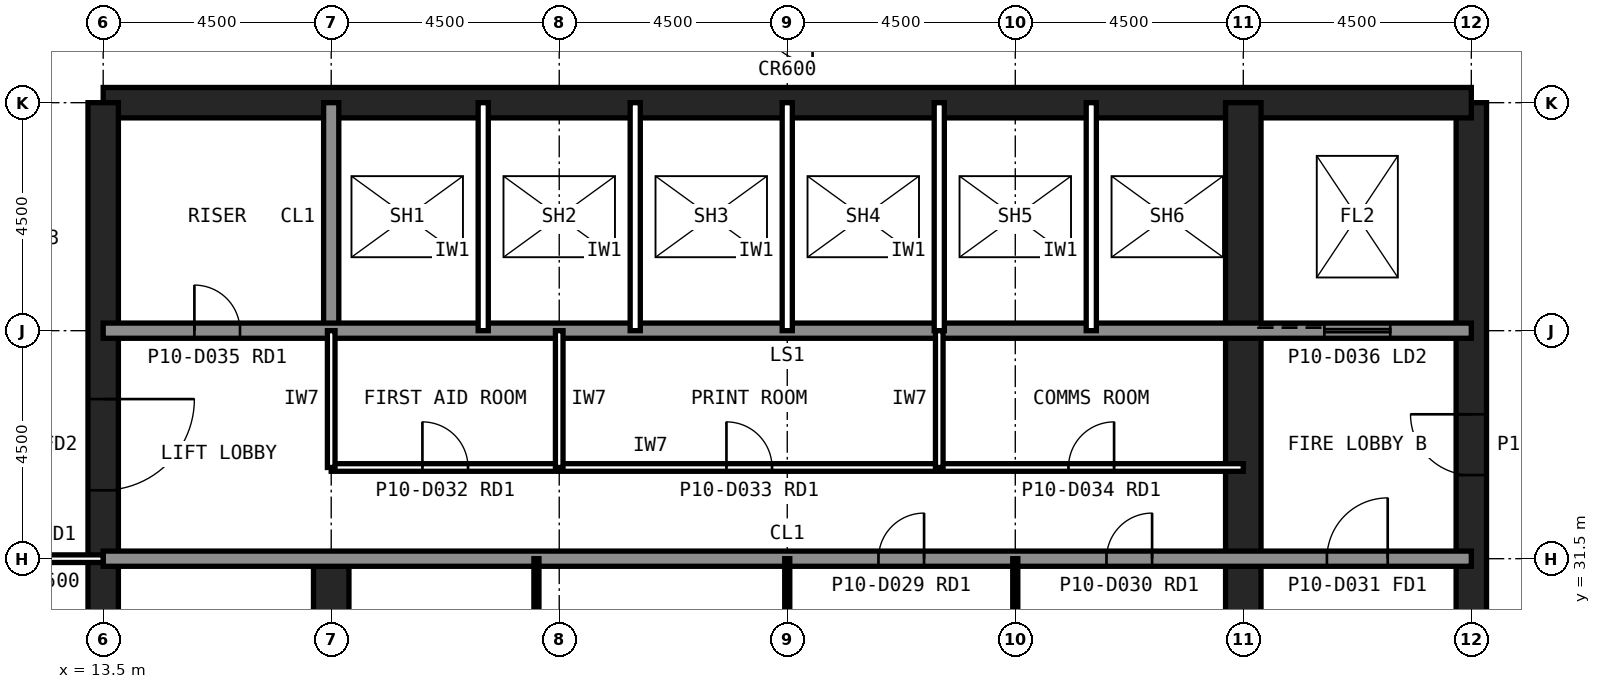
"""IFC4 building model, lengths in metres.
Left out: names, types, materials, properties, quantities, classifications, styles, units other than length and angle.
Written with IfcOpenShell. Run it as: python <this file> out.ifc"""

import sys

from ifc_helpers import new_model, si_unit, direction, frame, frame_2d, origin, place, context, subcontext, project, spatial, rectangle, extrude, element, fill, save


model = new_model("IFC4")
c1 = context("Model", 3, precision=1e-05, world=origin(), true_north=direction((0.0, 1.0)))
c2 = subcontext(c1, "Body", "Model", "MODEL_VIEW")
j1 = project(units=[si_unit("LENGTHUNIT", "METRE"), si_unit("PLANEANGLEUNIT", "RADIAN")], contexts=[c1])
p1 = place(None, origin())
s1 = spatial("IfcSite", under=j1, at=p1, CompositionType="ELEMENT")
p2 = place(p1, origin())
s2 = spatial("IfcBuilding", under=s1, at=p2, CompositionType="ELEMENT")
p3 = place(p2, frame((0.0, 0.0, 45.8)))
s3 = spatial("IfcBuildingStorey", under=s2, at=p3, CompositionType="ELEMENT", Elevation=45.8)
p4 = place(p3, frame((40.5, 13.5, 0.0), z_axis=(0.0, 0.0, 1.0), x_axis=(0.0, 1.0, 0.0)))
e1 = element("IfcWall", 1, at=p4, inside=s3, PredefinedType="SHEAR", context=c2, shape_type="SweptSolid", body=[
    extrude(rectangle(XDim=27.0, YDim=0.6, at=frame_2d((13.5, 0.0))), origin(), (0.0, 0.0, 1.0), 4.2),
])
p5 = place(p4, frame((5.85, 0.0, 0.0)))
e2 = element("IfcOpeningElement", 2, at=p5, cuts=e1, PredefinedType="OPENING", context=c2, shape_type="SweptSolid", body=[
    extrude(rectangle(XDim=1.8, YDim=2.1, at=frame_2d((0.9, 1.05))), frame((0.0, 0.31, 0.0), z_axis=(0.0, -1.0, 0.0), x_axis=(1.0, 0.0, 0.0)), (0.0, 0.0, 1.0), 0.62),
])
p6 = place(p4, frame((19.65, 0.0, 0.0)))
e3 = element("IfcOpeningElement", 3, at=p6, cuts=e1, PredefinedType="OPENING", context=c2, shape_type="SweptSolid", body=[
    extrude(rectangle(XDim=1.2, YDim=2.1, at=frame_2d((0.6, 1.05))), frame((0.0, 0.31, 0.0), z_axis=(0.0, -1.0, 0.0), x_axis=(1.0, 0.0, 0.0)), (0.0, 0.0, 1.0), 0.62),
])
p7 = place(p3, frame((40.5, 40.5, 0.0), z_axis=(0.0, 0.0, 1.0), x_axis=(-1.0, 0.0, 0.0)))
e4 = element("IfcWall", 4, at=p7, inside=s3, PredefinedType="SHEAR", context=c2, shape_type="SweptSolid", body=[
    extrude(rectangle(XDim=27.0, YDim=0.6, at=frame_2d((13.5, 0.0))), origin(), (0.0, 0.0, 1.0), 4.2),
])
p8 = place(p3, frame((13.5, 40.5, 0.0), z_axis=(0.0, 0.0, 1.0), x_axis=(0.0, -1.0, 0.0)))
e5 = element("IfcWall", 5, at=p8, inside=s3, PredefinedType="SHEAR", context=c2, shape_type="SweptSolid", body=[
    extrude(rectangle(XDim=27.0, YDim=0.6, at=frame_2d((13.5, 0.0))), origin(), (0.0, 0.0, 1.0), 4.2),
])
p9 = place(p8, frame((19.65, 0.0, 0.0)))
e6 = element("IfcOpeningElement", 6, at=p9, cuts=e5, PredefinedType="OPENING", context=c2, shape_type="SweptSolid", body=[
    extrude(rectangle(XDim=1.2, YDim=2.1, at=frame_2d((0.6, 1.05))), frame((0.0, 0.31, 0.0), z_axis=(0.0, -1.0, 0.0), x_axis=(1.0, 0.0, 0.0)), (0.0, 0.0, 1.0), 0.62),
])
p10 = place(p8, frame((5.85, 0.0, 0.0)))
e7 = element("IfcOpeningElement", 7, at=p10, cuts=e5, PredefinedType="OPENING", context=c2, shape_type="SweptSolid", body=[
    extrude(rectangle(XDim=1.8, YDim=2.1, at=frame_2d((0.9, 1.05))), frame((0.0, 0.31, 0.0), z_axis=(0.0, -1.0, 0.0), x_axis=(1.0, 0.0, 0.0)), (0.0, 0.0, 1.0), 0.62),
])
p11 = place(p3, frame((18.0, 13.5, 0.0), z_axis=(0.0, 0.0, 1.0), x_axis=(0.0, 1.0, 0.0)))
e8 = element("IfcWall", 8, at=p11, inside=s3, PredefinedType="SHEAR", context=c2, shape_type="SweptSolid", body=[
    extrude(rectangle(XDim=18.0, YDim=0.7, at=frame_2d((9.0, 0.0))), origin(), (0.0, 0.0, 1.0), 4.2),
])
p12 = place(p3, frame((18.0, 36.0, 0.0), z_axis=(0.0, 0.0, 1.0), x_axis=(0.0, 1.0, 0.0)))
e9 = element("IfcWall", 9, at=p12, inside=s3, PredefinedType="SOLIDWALL", context=c2, shape_type="SweptSolid", body=[
    extrude(rectangle(XDim=4.5, YDim=0.3, at=frame_2d((2.25, 0.0))), origin(), (0.0, 0.0, 1.0), 4.04),
])
p13 = place(p3, frame((36.0, 22.5, 0.0), z_axis=(0.0, 0.0, 1.0), x_axis=(0.0, 1.0, 0.0)))
e10 = element("IfcWall", 10, at=p13, inside=s3, PredefinedType="SHEAR", context=c2, shape_type="SweptSolid", body=[
    extrude(rectangle(XDim=18.0, YDim=0.7, at=frame_2d((9.0, 0.0))), origin(), (0.0, 0.0, 1.0), 4.2),
])
p14 = place(p3, frame((13.5, 36.0, 0.0), z_axis=(0.0, 0.0, 1.0), x_axis=(1.0, 0.0, 0.0)))
e11 = element("IfcWall", 11, at=p14, inside=s3, PredefinedType="SOLIDWALL", context=c2, shape_type="SweptSolid", body=[
    extrude(rectangle(XDim=27.0, YDim=0.3, at=frame_2d((13.5, 0.0))), origin(), (0.0, 0.0, 1.0), 4.04),
])
p15 = place(p14, frame((1.8, 0.0, 0.0)))
e12 = element("IfcOpeningElement", 12, at=p15, cuts=e11, PredefinedType="OPENING", context=c2, shape_type="SweptSolid", body=[
    extrude(rectangle(XDim=0.9, YDim=2.1, at=frame_2d((0.45, 1.05))), frame((0.0, 0.16, 0.0), z_axis=(0.0, -1.0, 0.0), x_axis=(1.0, 0.0, 0.0)), (0.0, 0.0, 1.0), 0.32),
])
p16 = place(p14, frame((24.1, 0.0, 0.0)))
e13 = element("IfcOpeningElement", 13, at=p16, cuts=e11, PredefinedType="OPENING", context=c2, shape_type="SweptSolid", body=[
    extrude(rectangle(XDim=1.3, YDim=2.2, at=frame_2d((0.65, 1.1))), frame((0.0, 0.16, 0.0), z_axis=(0.0, -1.0, 0.0), x_axis=(1.0, 0.0, 0.0)), (0.0, 0.0, 1.0), 0.32),
])
p17 = place(p3, frame((13.5, 31.5, 0.0), z_axis=(0.0, 0.0, 1.0), x_axis=(1.0, 0.0, 0.0)))
e14 = element("IfcWall", 14, at=p17, inside=s3, PredefinedType="SOLIDWALL", context=c2, shape_type="SweptSolid", body=[
    extrude(rectangle(XDim=27.0, YDim=0.3, at=frame_2d((13.5, 0.0))), origin(), (0.0, 0.0, 1.0), 4.04),
])
p18 = place(p17, frame((24.15, 0.0, 0.0)))
e15 = element("IfcOpeningElement", 15, at=p18, cuts=e14, PredefinedType="OPENING", context=c2, shape_type="SweptSolid", body=[
    extrude(rectangle(XDim=1.2, YDim=2.1, at=frame_2d((0.6, 1.05))), frame((0.0, 0.16, 0.0), z_axis=(0.0, -1.0, 0.0), x_axis=(1.0, 0.0, 0.0)), (0.0, 0.0, 1.0), 0.32),
])
p19 = place(p17, frame((15.3, 0.0, 0.0)))
e16 = element("IfcOpeningElement", 16, at=p19, cuts=e14, PredefinedType="OPENING", context=c2, shape_type="SweptSolid", body=[
    extrude(rectangle(XDim=0.9, YDim=2.1, at=frame_2d((0.45, 1.05))), frame((0.0, 0.16, 0.0), z_axis=(0.0, -1.0, 0.0), x_axis=(1.0, 0.0, 0.0)), (0.0, 0.0, 1.0), 0.32),
])
p20 = place(p17, frame((19.8, 0.0, 0.0)))
e17 = element("IfcOpeningElement", 17, at=p20, cuts=e14, PredefinedType="OPENING", context=c2, shape_type="SweptSolid", body=[
    extrude(rectangle(XDim=0.9, YDim=2.1, at=frame_2d((0.45, 1.05))), frame((0.0, 0.16, 0.0), z_axis=(0.0, -1.0, 0.0), x_axis=(1.0, 0.0, 0.0)), (0.0, 0.0, 1.0), 0.32),
])
for number, where, z_axis, x_axis in (
    (18, (21.0, 36.0, 0.0), (0.0, 0.0, 1.0), (0.0, 1.0, 0.0)),
    (19, (24.0, 36.0, 0.0), (0.0, 0.0, 1.0), (0.0, 1.0, 0.0)),
    (20, (27.0, 36.0, 0.0), (0.0, 0.0, 1.0), (0.0, 1.0, 0.0)),
    (21, (30.0, 36.0, 0.0), (0.0, 0.0, 1.0), (0.0, 1.0, 0.0)),
    (22, (33.0, 36.0, 0.0), (0.0, 0.0, 1.0), (0.0, 1.0, 0.0)),
):
    element("IfcWall", number, at=place(p3, frame(where, z_axis=z_axis, x_axis=x_axis)), inside=s3, PredefinedType="PARTITIONING", context=c2, shape_type="SweptSolid", body=[
        extrude(rectangle(XDim=4.5, YDim=0.2, at=frame_2d((2.25, 0.0))), origin(), (0.0, 0.0, 1.0), 4.04),
    ])
for number, where, z_axis, x_axis in (
    (23, (22.05, 22.5, 0.0), (0.0, 0.0, 1.0), (0.0, 1.0, 0.0)),
    (24, (27.0, 22.5, 0.0), (0.0, 0.0, 1.0), (0.0, 1.0, 0.0)),
    (25, (31.5, 22.5, 0.0), (0.0, 0.0, 1.0), (0.0, 1.0, 0.0)),
):
    element("IfcWall", number, at=place(p3, frame(where, z_axis=z_axis, x_axis=x_axis)), inside=s3, PredefinedType="PLUMBINGWALL", context=c2, shape_type="SweptSolid", body=[
        extrude(rectangle(XDim=9.0, YDim=0.1, at=frame_2d((4.5, 0.0))), origin(), (0.0, 0.0, 1.0), 4.04),
    ])
p21 = place(p3, frame((18.0, 33.3, 0.0), z_axis=(0.0, 0.0, 1.0), x_axis=(1.0, 0.0, 0.0)))
e26 = element("IfcWall", 26, at=p21, inside=s3, PredefinedType="PARTITIONING", context=c2, shape_type="SweptSolid", body=[
    extrude(rectangle(XDim=18.0, YDim=0.15, at=frame_2d((9.0, 0.0))), origin(), (0.0, 0.0, 1.0), 4.04),
])
p22 = place(p21, frame((1.8, 0.0, 0.0)))
e27 = element("IfcOpeningElement", 27, at=p22, cuts=e26, PredefinedType="OPENING", context=c2, shape_type="SweptSolid", body=[
    extrude(rectangle(XDim=0.9, YDim=2.1, at=frame_2d((0.45, 1.05))), frame((0.0, 0.085, 0.0), z_axis=(0.0, -1.0, 0.0), x_axis=(1.0, 0.0, 0.0)), (0.0, 0.0, 1.0), 0.17),
])
p23 = place(p21, frame((7.8, 0.0, 0.0)))
e28 = element("IfcOpeningElement", 28, at=p23, cuts=e26, PredefinedType="OPENING", context=c2, shape_type="SweptSolid", body=[
    extrude(rectangle(XDim=0.9, YDim=2.1, at=frame_2d((0.45, 1.05))), frame((0.0, 0.085, 0.0), z_axis=(0.0, -1.0, 0.0), x_axis=(1.0, 0.0, 0.0)), (0.0, 0.0, 1.0), 0.17),
])
p24 = place(p21, frame((14.55, 0.0, 0.0)))
e29 = element("IfcOpeningElement", 29, at=p24, cuts=e26, PredefinedType="OPENING", context=c2, shape_type="SweptSolid", body=[
    extrude(rectangle(XDim=0.9, YDim=2.1, at=frame_2d((0.45, 1.05))), frame((0.0, 0.085, 0.0), z_axis=(0.0, -1.0, 0.0), x_axis=(1.0, 0.0, 0.0)), (0.0, 0.0, 1.0), 0.17),
])
for number, where, z_axis, x_axis in (
    (30, (18.0, 33.3, 0.0), (0.0, 0.0, 1.0), (0.0, 1.0, 0.0)),
    (31, (22.5, 33.3, 0.0), (0.0, 0.0, 1.0), (0.0, 1.0, 0.0)),
    (32, (30.0, 33.3, 0.0), (0.0, 0.0, 1.0), (0.0, 1.0, 0.0)),
):
    element("IfcWall", number, at=place(p3, frame(where, z_axis=z_axis, x_axis=x_axis)), inside=s3, PredefinedType="PARTITIONING", context=c2, shape_type="SweptSolid", body=[
        extrude(rectangle(XDim=2.7, YDim=0.15, at=frame_2d((1.35, 0.0))), origin(), (0.0, 0.0, 1.0), 4.04),
    ])
p25 = place(p3, frame((13.5, 31.5, 0.0), z_axis=(0.0, 0.0, 1.0), x_axis=(-1.0, 0.0, 0.0)))
e33 = element("IfcWall", 33, at=p25, inside=s3, PredefinedType="PARTITIONING", context=c2, shape_type="SweptSolid", body=[
    extrude(rectangle(XDim=3.6, YDim=0.15, at=frame_2d((1.8, 0.0))), origin(), (0.0, 0.0, 1.0), 3.189),
])
p26 = place(p25, frame((1.3, 0.0, 0.0)))
e34 = element("IfcOpeningElement", 34, at=p26, cuts=e33, PredefinedType="OPENING", context=c2, shape_type="SweptSolid", body=[
    extrude(rectangle(XDim=1.0, YDim=2.1, at=frame_2d((0.5, 1.05))), frame((0.0, 0.085, 0.0), z_axis=(0.0, -1.0, 0.0), x_axis=(1.0, 0.0, 0.0)), (0.0, 0.0, 1.0), 0.17),
])
p27 = place(p10, origin())
e35 = element("IfcDoor", 35, at=p27, inside=s3, OperationType="SINGLE_SWING_LEFT", PredefinedType="DOOR", context=c2, shape_type="SweptSolid", body=[
    extrude(rectangle(XDim=1.8, YDim=2.1, at=frame_2d((0.9, 1.05))), frame((0.0, 0.025, 0.0), z_axis=(0.0, -1.0, 0.0), x_axis=(1.0, 0.0, 0.0)), (0.0, 0.0, 1.0), 0.05),
])
fill(e7, e35)
p28 = place(p6, origin())
e36 = element("IfcDoor", 36, at=p28, inside=s3, OperationType="SINGLE_SWING_RIGHT", PredefinedType="DOOR", context=c2, shape_type="SweptSolid", body=[
    extrude(rectangle(XDim=1.2, YDim=2.1, at=frame_2d((0.6, 1.05))), frame((0.0, 0.025, 0.0), z_axis=(0.0, -1.0, 0.0), x_axis=(1.0, 0.0, 0.0)), (0.0, 0.0, 1.0), 0.05),
])
fill(e3, e36)
p29 = place(p18, origin())
e37 = element("IfcDoor", 37, at=p29, inside=s3, OperationType="SINGLE_SWING_RIGHT", PredefinedType="DOOR", context=c2, shape_type="SweptSolid", body=[
    extrude(rectangle(XDim=1.2, YDim=2.1, at=frame_2d((0.6, 1.05))), frame((0.0, 0.025, 0.0), z_axis=(0.0, -1.0, 0.0), x_axis=(1.0, 0.0, 0.0)), (0.0, 0.0, 1.0), 0.05),
])
fill(e15, e37)
p30 = place(p19, origin())
e38 = element("IfcDoor", 38, at=p30, inside=s3, OperationType="SINGLE_SWING_RIGHT", PredefinedType="DOOR", context=c2, shape_type="SweptSolid", body=[
    extrude(rectangle(XDim=0.9, YDim=2.1, at=frame_2d((0.45, 1.05))), frame((0.0, 0.025, 0.0), z_axis=(0.0, -1.0, 0.0), x_axis=(1.0, 0.0, 0.0)), (0.0, 0.0, 1.0), 0.05),
])
fill(e16, e38)
p31 = place(p20, origin())
e39 = element("IfcDoor", 39, at=p31, inside=s3, OperationType="SINGLE_SWING_RIGHT", PredefinedType="DOOR", context=c2, shape_type="SweptSolid", body=[
    extrude(rectangle(XDim=0.9, YDim=2.1, at=frame_2d((0.45, 1.05))), frame((0.0, 0.025, 0.0), z_axis=(0.0, -1.0, 0.0), x_axis=(1.0, 0.0, 0.0)), (0.0, 0.0, 1.0), 0.05),
])
fill(e17, e39)
p32 = place(p15, origin())
e40 = element("IfcDoor", 40, at=p32, inside=s3, OperationType="SINGLE_SWING_LEFT", PredefinedType="DOOR", context=c2, shape_type="SweptSolid", body=[
    extrude(rectangle(XDim=0.9, YDim=2.1, at=frame_2d((0.45, 1.05))), frame((0.0, 0.025, 0.0), z_axis=(0.0, -1.0, 0.0), x_axis=(1.0, 0.0, 0.0)), (0.0, 0.0, 1.0), 0.05),
])
fill(e12, e40)
p33 = place(p22, origin())
e41 = element("IfcDoor", 41, at=p33, inside=s3, OperationType="SINGLE_SWING_LEFT", PredefinedType="DOOR", context=c2, shape_type="SweptSolid", body=[
    extrude(rectangle(XDim=0.9, YDim=2.1, at=frame_2d((0.45, 1.05))), frame((0.0, 0.025, 0.0), z_axis=(0.0, -1.0, 0.0), x_axis=(1.0, 0.0, 0.0)), (0.0, 0.0, 1.0), 0.05),
])
fill(e27, e41)
p34 = place(p23, origin())
e42 = element("IfcDoor", 42, at=p34, inside=s3, OperationType="SINGLE_SWING_LEFT", PredefinedType="DOOR", context=c2, shape_type="SweptSolid", body=[
    extrude(rectangle(XDim=0.9, YDim=2.1, at=frame_2d((0.45, 1.05))), frame((0.0, 0.025, 0.0), z_axis=(0.0, -1.0, 0.0), x_axis=(1.0, 0.0, 0.0)), (0.0, 0.0, 1.0), 0.05),
])
fill(e28, e42)
p35 = place(p24, origin())
e43 = element("IfcDoor", 43, at=p35, inside=s3, OperationType="SINGLE_SWING_RIGHT", PredefinedType="DOOR", context=c2, shape_type="SweptSolid", body=[
    extrude(rectangle(XDim=0.9, YDim=2.1, at=frame_2d((0.45, 1.05))), frame((0.0, 0.025, 0.0), z_axis=(0.0, -1.0, 0.0), x_axis=(1.0, 0.0, 0.0)), (0.0, 0.0, 1.0), 0.05),
])
fill(e29, e43)
p36 = place(p16, origin())
e44 = element("IfcDoor", 44, at=p36, inside=s3, OperationType="SLIDING_TO_LEFT", PredefinedType="DOOR", context=c2, shape_type="SweptSolid", body=[
    extrude(rectangle(XDim=1.3, YDim=2.2, at=frame_2d((0.65, 1.1))), frame((0.0, 0.025, 0.0), z_axis=(0.0, -1.0, 0.0), x_axis=(1.0, 0.0, 0.0)), (0.0, 0.0, 1.0), 0.05),
])
fill(e13, e44)
save(model, sys.argv[1])
